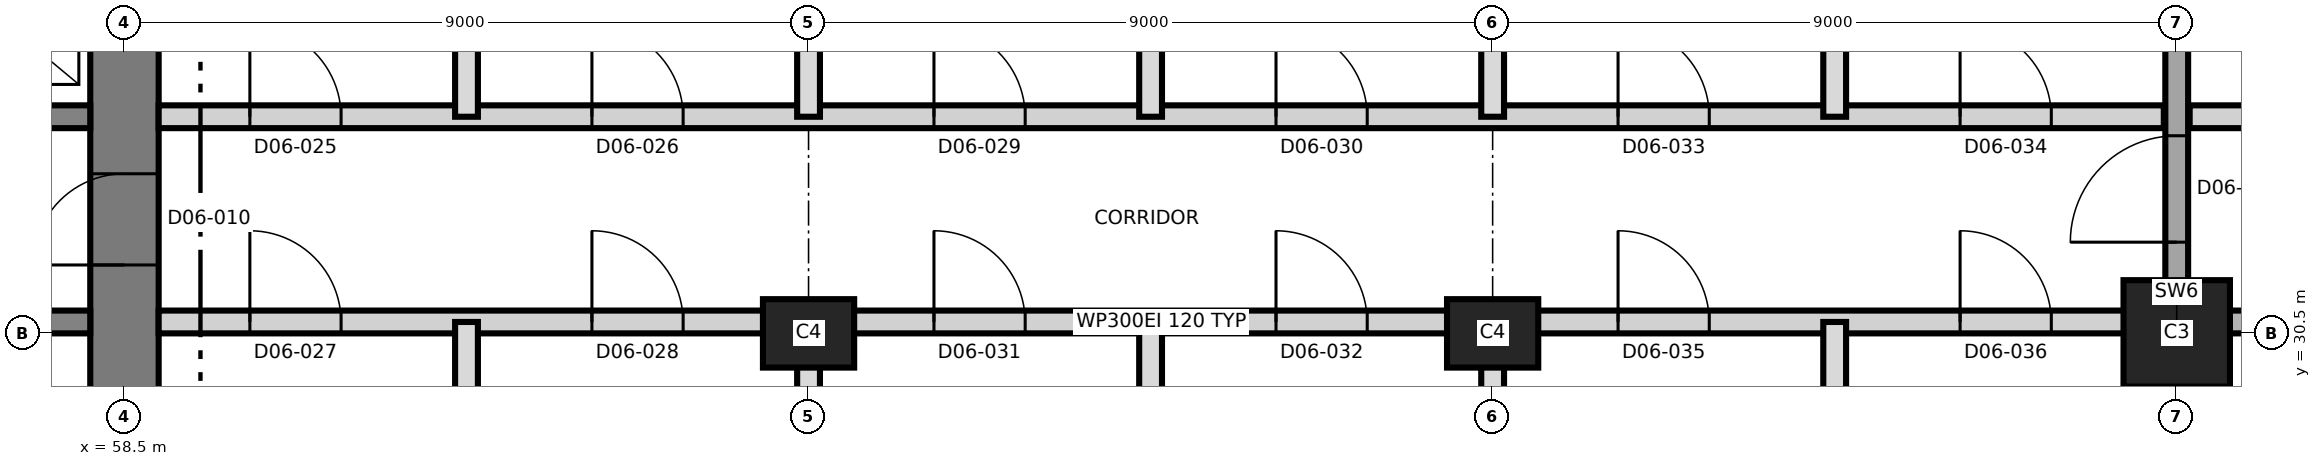
"""IFC4 building model, lengths in metres.
Left out: names, types, materials, properties, quantities, classifications, styles, units other than length and angle.
Written with IfcOpenShell. Run it as: python <this file> out.ifc"""

import sys

from ifc_helpers import new_model, si_unit, direction, frame, frame_2d, origin, origin_2d, place, context, subcontext, project, spatial, rectangle, extrude, element, fill, save


model = new_model("IFC4")
c1 = context("Model", 3, precision=1e-05, world=origin(), true_north=direction((0.0, 1.0)))
c2 = subcontext(c1, "Body", "Model", "MODEL_VIEW")
j1 = project(units=[si_unit("LENGTHUNIT", "METRE"), si_unit("PLANEANGLEUNIT", "RADIAN")], contexts=[c1])
p1 = place(None, origin())
s1 = spatial("IfcSite", under=j1, at=p1, CompositionType="ELEMENT")
p2 = place(p1, origin())
s2 = spatial("IfcBuilding", under=s1, at=p2, CompositionType="ELEMENT")
p3 = place(p2, frame((0.0, 0.0, 81.6)))
s3 = spatial("IfcBuildingStorey", under=s2, at=p3, CompositionType="ELEMENT", Elevation=81.6)
p4 = place(p3, frame((58.5, 21.05, 0.0), z_axis=(0.0, 0.0, 1.0), x_axis=(0.0, 1.0, 0.0)))
e1 = element("IfcWall", 1, at=p4, inside=s3, PredefinedType="SHEAR", context=c2, shape_type="SweptSolid", body=[
    extrude(rectangle(XDim=18.9, YDim=0.9, at=frame_2d((9.45, 0.0))), origin(), (0.0, 0.0, 1.0), 5.5),
])
p5 = place(p4, frame((10.35, 0.0, 0.0)))
e2 = element("IfcOpeningElement", 2, at=p5, cuts=e1, PredefinedType="OPENING", context=c2, shape_type="SweptSolid", body=[
    extrude(rectangle(XDim=1.2, YDim=2.1, at=frame_2d((0.6, 1.05))), frame((0.0, 0.46, 0.0), z_axis=(0.0, -1.0, 0.0), x_axis=(1.0, 0.0, 0.0)), (0.0, 0.0, 1.0), 0.92),
])
p6 = place(p3, frame((31.95, 30.65, 0.0), z_axis=(0.0, 0.0, 1.0), x_axis=(1.0, 0.0, 0.0)))
e3 = element("IfcWall", 3, at=p6, inside=s3, PredefinedType="SHEAR", context=c2, shape_type="SweptSolid", body=[
    extrude(rectangle(XDim=26.1, YDim=0.3, at=frame_2d((13.05, 0.0))), origin(), (0.0, 0.0, 1.0), 5.5),
])
p7 = place(p6, frame((24.55, 0.0, 0.0)))
e4 = element("IfcOpeningElement", 4, at=p7, cuts=e3, PredefinedType="OPENING", context=c2, shape_type="SweptSolid", body=[
    extrude(rectangle(XDim=1.0, YDim=2.1, at=frame_2d((0.5, 1.05))), frame((0.0, 0.16, 0.0), z_axis=(0.0, -1.0, 0.0), x_axis=(1.0, 0.0, 0.0)), (0.0, 0.0, 1.0), 0.32),
])
p8 = place(p6, frame((11.35, 0.0, 0.0)))
e5 = element("IfcOpeningElement", 5, at=p8, cuts=e3, PredefinedType="OPENING", context=c2, shape_type="SweptSolid", body=[
    extrude(rectangle(XDim=1.0, YDim=2.1, at=frame_2d((0.5, 1.05))), frame((0.0, 0.16, 0.0), z_axis=(0.0, -1.0, 0.0), x_axis=(1.0, 0.0, 0.0)), (0.0, 0.0, 1.0), 0.32),
])
p9 = place(p3, frame((31.95, 33.35, 0.0), z_axis=(0.0, 0.0, 1.0), x_axis=(1.0, 0.0, 0.0)))
e6 = element("IfcWall", 6, at=p9, inside=s3, PredefinedType="SHEAR", context=c2, shape_type="SweptSolid", body=[
    extrude(rectangle(XDim=26.1, YDim=0.3, at=frame_2d((13.05, 0.0))), origin(), (0.0, 0.0, 1.0), 5.5),
])
p10 = place(p9, frame((13.7, 0.0, 0.0)))
e7 = element("IfcOpeningElement", 7, at=p10, cuts=e6, PredefinedType="OPENING", context=c2, shape_type="SweptSolid", body=[
    extrude(rectangle(XDim=1.4, YDim=2.1, at=frame_2d((0.7, 1.05))), frame((0.0, 0.16, 0.0), z_axis=(0.0, -1.0, 0.0), x_axis=(1.0, 0.0, 0.0)), (0.0, 0.0, 1.0), 0.32),
])
p11 = place(p9, frame((5.175, 0.0, 0.0)))
e8 = element("IfcOpeningElement", 8, at=p11, cuts=e6, PredefinedType="OPENING", context=c2, shape_type="SweptSolid", body=[
    extrude(rectangle(XDim=1.2, YDim=2.1, at=frame_2d((0.6, 1.05))), frame((0.0, 0.16, 0.0), z_axis=(0.0, -1.0, 0.0), x_axis=(1.0, 0.0, 0.0)), (0.0, 0.0, 1.0), 0.32),
])
p12 = place(p9, frame((19.725, 0.0, 0.0)))
e9 = element("IfcOpeningElement", 9, at=p12, cuts=e6, PredefinedType="OPENING", context=c2, shape_type="SweptSolid", body=[
    extrude(rectangle(XDim=1.2, YDim=2.1, at=frame_2d((0.6, 1.05))), frame((0.0, 0.16, 0.0), z_axis=(0.0, -1.0, 0.0), x_axis=(1.0, 0.0, 0.0)), (0.0, 0.0, 1.0), 0.32),
])
for number, where, z_axis, x_axis in (
    (10, (67.5, 30.5, 0.0), (0.0, 0.0, 1.0), (1.0, 0.0, 0.0)),
    (11, (76.5, 30.5, 0.0), (0.0, 0.0, 1.0), (1.0, 0.0, 0.0)),
):
    element("IfcColumn", number, at=place(p3, frame(where, z_axis=z_axis, x_axis=x_axis)), inside=s3, PredefinedType="COLUMN", context=c2, shape_type="SweptSolid", body=[
        extrude(rectangle(XDim=1.2, YDim=0.9, at=origin_2d()), origin(), (0.0, 0.0, 1.0), 5.5),
    ])
p13 = place(p3, frame((85.5, 30.5, 0.0), z_axis=(0.0, 0.0, 1.0), x_axis=(1.0, 0.0, 0.0)))
e12 = element("IfcColumn", 12, at=p13, inside=s3, PredefinedType="COLUMN", context=c2, shape_type="SweptSolid", body=[
    extrude(rectangle(XDim=1.4, YDim=1.4, at=origin_2d()), origin(), (0.0, 0.0, 1.0), 5.5),
])
p14 = place(p3, frame((85.5, 20.35, 0.0), z_axis=(0.0, 0.0, 1.0), x_axis=(0.0, 1.0, 0.0)))
e13 = element("IfcWall", 13, at=p14, inside=s3, PredefinedType="SHEAR", context=c2, shape_type="SweptSolid", body=[
    extrude(rectangle(XDim=20.3, YDim=0.3, at=frame_2d((10.15, 0.0))), origin(), (0.0, 0.0, 1.0), 5.5),
])
p15 = place(p14, frame((11.35, 0.0, 0.0)))
e14 = element("IfcOpeningElement", 14, at=p15, cuts=e13, PredefinedType="OPENING", context=c2, shape_type="SweptSolid", body=[
    extrude(rectangle(XDim=1.4, YDim=2.1, at=frame_2d((0.7, 1.05))), frame((0.0, 0.16, 0.0), z_axis=(0.0, -1.0, 0.0), x_axis=(1.0, 0.0, 0.0)), (0.0, 0.0, 1.0), 0.32),
])
p16 = place(p3, frame((58.95, 30.65, 0.0), z_axis=(0.0, 0.0, 1.0), x_axis=(1.0, 0.0, 0.0)))
e15 = element("IfcWall", 15, at=p16, inside=s3, PredefinedType="PARTITIONING", context=c2, shape_type="SweptSolid", body=[
    extrude(rectangle(XDim=26.38, YDim=0.3, at=frame_2d((13.19, 0.0))), origin(), (0.0, 0.0, 1.0), 5.2),
])
p17 = place(p16, frame((1.2, 0.0, 0.0)))
e16 = element("IfcOpeningElement", 16, at=p17, cuts=e15, PredefinedType="OPENING", context=c2, shape_type="SweptSolid", body=[
    extrude(rectangle(XDim=1.2, YDim=2.1, at=frame_2d((0.6, 1.05))), frame((0.0, 0.16, 0.0), z_axis=(0.0, -1.0, 0.0), x_axis=(1.0, 0.0, 0.0)), (0.0, 0.0, 1.0), 0.32),
])
p18 = place(p16, frame((5.7, 0.0, 0.0)))
e17 = element("IfcOpeningElement", 17, at=p18, cuts=e15, PredefinedType="OPENING", context=c2, shape_type="SweptSolid", body=[
    extrude(rectangle(XDim=1.2, YDim=2.1, at=frame_2d((0.6, 1.05))), frame((0.0, 0.16, 0.0), z_axis=(0.0, -1.0, 0.0), x_axis=(1.0, 0.0, 0.0)), (0.0, 0.0, 1.0), 0.32),
])
p19 = place(p16, frame((10.2, 0.0, 0.0)))
e18 = element("IfcOpeningElement", 18, at=p19, cuts=e15, PredefinedType="OPENING", context=c2, shape_type="SweptSolid", body=[
    extrude(rectangle(XDim=1.2, YDim=2.1, at=frame_2d((0.6, 1.05))), frame((0.0, 0.16, 0.0), z_axis=(0.0, -1.0, 0.0), x_axis=(1.0, 0.0, 0.0)), (0.0, 0.0, 1.0), 0.32),
])
p20 = place(p16, frame((14.7, 0.0, 0.0)))
e19 = element("IfcOpeningElement", 19, at=p20, cuts=e15, PredefinedType="OPENING", context=c2, shape_type="SweptSolid", body=[
    extrude(rectangle(XDim=1.2, YDim=2.1, at=frame_2d((0.6, 1.05))), frame((0.0, 0.16, 0.0), z_axis=(0.0, -1.0, 0.0), x_axis=(1.0, 0.0, 0.0)), (0.0, 0.0, 1.0), 0.32),
])
p21 = place(p16, frame((19.2, 0.0, 0.0)))
e20 = element("IfcOpeningElement", 20, at=p21, cuts=e15, PredefinedType="OPENING", context=c2, shape_type="SweptSolid", body=[
    extrude(rectangle(XDim=1.2, YDim=2.1, at=frame_2d((0.6, 1.05))), frame((0.0, 0.16, 0.0), z_axis=(0.0, -1.0, 0.0), x_axis=(1.0, 0.0, 0.0)), (0.0, 0.0, 1.0), 0.32),
])
p22 = place(p16, frame((23.7, 0.0, 0.0)))
e21 = element("IfcOpeningElement", 21, at=p22, cuts=e15, PredefinedType="OPENING", context=c2, shape_type="SweptSolid", body=[
    extrude(rectangle(XDim=1.2, YDim=2.1, at=frame_2d((0.6, 1.05))), frame((0.0, 0.16, 0.0), z_axis=(0.0, -1.0, 0.0), x_axis=(1.0, 0.0, 0.0)), (0.0, 0.0, 1.0), 0.32),
])
p23 = place(p3, frame((85.67, 30.65, 0.0), z_axis=(0.0, 0.0, 1.0), x_axis=(1.0, 0.0, 0.0)))
e22 = element("IfcWall", 22, at=p23, inside=s3, PredefinedType="SHEAR", context=c2, shape_type="SweptSolid", body=[
    extrude(rectangle(XDim=9.58, YDim=0.3, at=frame_2d((4.79, 0.0))), origin(), (0.0, 0.0, 1.0), 5.2),
])
p24 = place(p23, frame((2.08, 0.0, 0.0)))
e23 = element("IfcOpeningElement", 23, at=p24, cuts=e22, PredefinedType="OPENING", context=c2, shape_type="SweptSolid", body=[
    extrude(rectangle(XDim=1.2, YDim=2.1, at=frame_2d((0.6, 1.05))), frame((0.0, 0.16, 0.0), z_axis=(0.0, -1.0, 0.0), x_axis=(1.0, 0.0, 0.0)), (0.0, 0.0, 1.0), 0.32),
])
p25 = place(p23, frame((5.63, 0.0, 0.0)))
e24 = element("IfcOpeningElement", 24, at=p25, cuts=e22, PredefinedType="OPENING", context=c2, shape_type="SweptSolid", body=[
    extrude(rectangle(XDim=1.0, YDim=2.1, at=frame_2d((0.5, 1.05))), frame((0.0, 0.16, 0.0), z_axis=(0.0, -1.0, 0.0), x_axis=(1.0, 0.0, 0.0)), (0.0, 0.0, 1.0), 0.32),
])
p26 = place(p3, frame((58.95, 33.35, 0.0), z_axis=(0.0, 0.0, 1.0), x_axis=(1.0, 0.0, 0.0)))
e25 = element("IfcWall", 25, at=p26, inside=s3, PredefinedType="PARTITIONING", context=c2, shape_type="SweptSolid", body=[
    extrude(rectangle(XDim=26.38, YDim=0.3, at=frame_2d((13.19, 0.0))), origin(), (0.0, 0.0, 1.0), 5.2),
])
p27 = place(p26, frame((1.2, 0.0, 0.0)))
e26 = element("IfcOpeningElement", 26, at=p27, cuts=e25, PredefinedType="OPENING", context=c2, shape_type="SweptSolid", body=[
    extrude(rectangle(XDim=1.2, YDim=2.1, at=frame_2d((0.6, 1.05))), frame((0.0, 0.16, 0.0), z_axis=(0.0, -1.0, 0.0), x_axis=(1.0, 0.0, 0.0)), (0.0, 0.0, 1.0), 0.32),
])
p28 = place(p26, frame((5.7, 0.0, 0.0)))
e27 = element("IfcOpeningElement", 27, at=p28, cuts=e25, PredefinedType="OPENING", context=c2, shape_type="SweptSolid", body=[
    extrude(rectangle(XDim=1.2, YDim=2.1, at=frame_2d((0.6, 1.05))), frame((0.0, 0.16, 0.0), z_axis=(0.0, -1.0, 0.0), x_axis=(1.0, 0.0, 0.0)), (0.0, 0.0, 1.0), 0.32),
])
p29 = place(p26, frame((10.2, 0.0, 0.0)))
e28 = element("IfcOpeningElement", 28, at=p29, cuts=e25, PredefinedType="OPENING", context=c2, shape_type="SweptSolid", body=[
    extrude(rectangle(XDim=1.2, YDim=2.1, at=frame_2d((0.6, 1.05))), frame((0.0, 0.16, 0.0), z_axis=(0.0, -1.0, 0.0), x_axis=(1.0, 0.0, 0.0)), (0.0, 0.0, 1.0), 0.32),
])
p30 = place(p26, frame((14.7, 0.0, 0.0)))
e29 = element("IfcOpeningElement", 29, at=p30, cuts=e25, PredefinedType="OPENING", context=c2, shape_type="SweptSolid", body=[
    extrude(rectangle(XDim=1.2, YDim=2.1, at=frame_2d((0.6, 1.05))), frame((0.0, 0.16, 0.0), z_axis=(0.0, -1.0, 0.0), x_axis=(1.0, 0.0, 0.0)), (0.0, 0.0, 1.0), 0.32),
])
p31 = place(p26, frame((19.2, 0.0, 0.0)))
e30 = element("IfcOpeningElement", 30, at=p31, cuts=e25, PredefinedType="OPENING", context=c2, shape_type="SweptSolid", body=[
    extrude(rectangle(XDim=1.2, YDim=2.1, at=frame_2d((0.6, 1.05))), frame((0.0, 0.16, 0.0), z_axis=(0.0, -1.0, 0.0), x_axis=(1.0, 0.0, 0.0)), (0.0, 0.0, 1.0), 0.32),
])
p32 = place(p26, frame((23.7, 0.0, 0.0)))
e31 = element("IfcOpeningElement", 31, at=p32, cuts=e25, PredefinedType="OPENING", context=c2, shape_type="SweptSolid", body=[
    extrude(rectangle(XDim=1.2, YDim=2.1, at=frame_2d((0.6, 1.05))), frame((0.0, 0.16, 0.0), z_axis=(0.0, -1.0, 0.0), x_axis=(1.0, 0.0, 0.0)), (0.0, 0.0, 1.0), 0.32),
])
p33 = place(p3, frame((85.67, 33.35, 0.0), z_axis=(0.0, 0.0, 1.0), x_axis=(1.0, 0.0, 0.0)))
e32 = element("IfcWall", 32, at=p33, inside=s3, PredefinedType="PARTITIONING", context=c2, shape_type="SweptSolid", body=[
    extrude(rectangle(XDim=9.705, YDim=0.3, at=frame_2d((4.853, 0.0))), origin(), (0.0, 0.0, 1.0), 5.15),
])
p34 = place(p33, frame((2.73, 0.0, 0.0)))
e33 = element("IfcOpeningElement", 33, at=p34, cuts=e32, PredefinedType="OPENING", context=c2, shape_type="SweptSolid", body=[
    extrude(rectangle(XDim=1.2, YDim=2.1, at=frame_2d((0.6, 1.05))), frame((0.0, 0.16, 0.0), z_axis=(0.0, -1.0, 0.0), x_axis=(1.0, 0.0, 0.0)), (0.0, 0.0, 1.0), 0.32),
])
p35 = place(p3, frame((63.0, 21.9, 0.0), z_axis=(0.0, 0.0, 1.0), x_axis=(0.0, 1.0, 0.0)))
e34 = element("IfcWall", 34, at=p35, inside=s3, PredefinedType="PARTITIONING", context=c2, shape_type="SweptSolid", body=[
    extrude(rectangle(XDim=8.75, YDim=0.3, at=frame_2d((4.375, 0.0))), origin(), (0.0, 0.0, 1.0), 5.2),
])
p36 = place(p3, frame((63.0, 33.35, 0.0), z_axis=(0.0, 0.0, 1.0), x_axis=(0.0, 1.0, 0.0)))
e35 = element("IfcWall", 35, at=p36, inside=s3, PredefinedType="PARTITIONING", context=c2, shape_type="SweptSolid", body=[
    extrude(rectangle(XDim=5.75, YDim=0.3, at=frame_2d((2.875, 0.0))), origin(), (0.0, 0.0, 1.0), 5.2),
])
p37 = place(p3, frame((67.5, 21.9, 0.0), z_axis=(0.0, 0.0, 1.0), x_axis=(0.0, 1.0, 0.0)))
e36 = element("IfcWall", 36, at=p37, inside=s3, PredefinedType="PARTITIONING", context=c2, shape_type="SweptSolid", body=[
    extrude(rectangle(XDim=8.75, YDim=0.3, at=frame_2d((4.375, 0.0))), origin(), (0.0, 0.0, 1.0), 5.2),
])
p38 = place(p3, frame((67.5, 33.35, 0.0), z_axis=(0.0, 0.0, 1.0), x_axis=(0.0, 1.0, 0.0)))
e37 = element("IfcWall", 37, at=p38, inside=s3, PredefinedType="PARTITIONING", context=c2, shape_type="SweptSolid", body=[
    extrude(rectangle(XDim=5.75, YDim=0.3, at=frame_2d((2.875, 0.0))), origin(), (0.0, 0.0, 1.0), 5.2),
])
p39 = place(p3, frame((72.0, 21.9, 0.0), z_axis=(0.0, 0.0, 1.0), x_axis=(0.0, 1.0, 0.0)))
e38 = element("IfcWall", 38, at=p39, inside=s3, PredefinedType="PARTITIONING", context=c2, shape_type="SweptSolid", body=[
    extrude(rectangle(XDim=8.75, YDim=0.3, at=frame_2d((4.375, 0.0))), origin(), (0.0, 0.0, 1.0), 5.2),
])
p40 = place(p3, frame((72.0, 33.35, 0.0), z_axis=(0.0, 0.0, 1.0), x_axis=(0.0, 1.0, 0.0)))
e39 = element("IfcWall", 39, at=p40, inside=s3, PredefinedType="PARTITIONING", context=c2, shape_type="SweptSolid", body=[
    extrude(rectangle(XDim=5.75, YDim=0.3, at=frame_2d((2.875, 0.0))), origin(), (0.0, 0.0, 1.0), 5.2),
])
p41 = place(p3, frame((76.5, 21.9, 0.0), z_axis=(0.0, 0.0, 1.0), x_axis=(0.0, 1.0, 0.0)))
e40 = element("IfcWall", 40, at=p41, inside=s3, PredefinedType="PARTITIONING", context=c2, shape_type="SweptSolid", body=[
    extrude(rectangle(XDim=8.75, YDim=0.3, at=frame_2d((4.375, 0.0))), origin(), (0.0, 0.0, 1.0), 5.2),
])
p42 = place(p3, frame((76.5, 33.35, 0.0), z_axis=(0.0, 0.0, 1.0), x_axis=(0.0, 1.0, 0.0)))
e41 = element("IfcWall", 41, at=p42, inside=s3, PredefinedType="PARTITIONING", context=c2, shape_type="SweptSolid", body=[
    extrude(rectangle(XDim=5.75, YDim=0.3, at=frame_2d((2.875, 0.0))), origin(), (0.0, 0.0, 1.0), 5.2),
])
p43 = place(p3, frame((81.0, 21.9, 0.0), z_axis=(0.0, 0.0, 1.0), x_axis=(0.0, 1.0, 0.0)))
e42 = element("IfcWall", 42, at=p43, inside=s3, PredefinedType="PARTITIONING", context=c2, shape_type="SweptSolid", body=[
    extrude(rectangle(XDim=8.75, YDim=0.3, at=frame_2d((4.375, 0.0))), origin(), (0.0, 0.0, 1.0), 5.2),
])
p44 = place(p3, frame((81.0, 33.35, 0.0), z_axis=(0.0, 0.0, 1.0), x_axis=(0.0, 1.0, 0.0)))
e43 = element("IfcWall", 43, at=p44, inside=s3, PredefinedType="PARTITIONING", context=c2, shape_type="SweptSolid", body=[
    extrude(rectangle(XDim=5.75, YDim=0.3, at=frame_2d((2.875, 0.0))), origin(), (0.0, 0.0, 1.0), 5.2),
])
p45 = place(p5, origin())
e44 = element("IfcDoor", 44, at=p45, inside=s3, OperationType="SINGLE_SWING_LEFT", PredefinedType="DOOR", context=c2, shape_type="SweptSolid", body=[
    extrude(rectangle(XDim=1.2, YDim=2.1, at=frame_2d((0.6, 1.05))), frame((0.0, 0.025, 0.0), z_axis=(0.0, -1.0, 0.0), x_axis=(1.0, 0.0, 0.0)), (0.0, 0.0, 1.0), 0.05),
])
fill(e2, e44)
p46 = place(p27, origin())
e45 = element("IfcDoor", 45, at=p46, inside=s3, OperationType="SINGLE_SWING_LEFT", PredefinedType="DOOR", context=c2, shape_type="SweptSolid", body=[
    extrude(rectangle(XDim=1.2, YDim=2.1, at=frame_2d((0.6, 1.05))), frame((0.0, 0.025, 0.0), z_axis=(0.0, -1.0, 0.0), x_axis=(1.0, 0.0, 0.0)), (0.0, 0.0, 1.0), 0.05),
])
fill(e26, e45)
p47 = place(p28, origin())
e46 = element("IfcDoor", 46, at=p47, inside=s3, OperationType="SINGLE_SWING_LEFT", PredefinedType="DOOR", context=c2, shape_type="SweptSolid", body=[
    extrude(rectangle(XDim=1.2, YDim=2.1, at=frame_2d((0.6, 1.05))), frame((0.0, 0.025, 0.0), z_axis=(0.0, -1.0, 0.0), x_axis=(1.0, 0.0, 0.0)), (0.0, 0.0, 1.0), 0.05),
])
fill(e27, e46)
p48 = place(p17, origin())
e47 = element("IfcDoor", 47, at=p48, inside=s3, OperationType="SINGLE_SWING_RIGHT", PredefinedType="DOOR", context=c2, shape_type="SweptSolid", body=[
    extrude(rectangle(XDim=1.2, YDim=2.1, at=frame_2d((0.6, 1.05))), frame((0.0, 0.025, 0.0), z_axis=(0.0, -1.0, 0.0), x_axis=(1.0, 0.0, 0.0)), (0.0, 0.0, 1.0), 0.05),
])
fill(e16, e47)
p49 = place(p18, origin())
e48 = element("IfcDoor", 48, at=p49, inside=s3, OperationType="SINGLE_SWING_LEFT", PredefinedType="DOOR", context=c2, shape_type="SweptSolid", body=[
    extrude(rectangle(XDim=1.2, YDim=2.1, at=frame_2d((0.6, 1.05))), frame((0.0, 0.025, 0.0), z_axis=(0.0, -1.0, 0.0), x_axis=(1.0, 0.0, 0.0)), (0.0, 0.0, 1.0), 0.05),
])
fill(e17, e48)
p50 = place(p29, origin())
e49 = element("IfcDoor", 49, at=p50, inside=s3, OperationType="SINGLE_SWING_LEFT", PredefinedType="DOOR", context=c2, shape_type="SweptSolid", body=[
    extrude(rectangle(XDim=1.2, YDim=2.1, at=frame_2d((0.6, 1.05))), frame((0.0, 0.025, 0.0), z_axis=(0.0, -1.0, 0.0), x_axis=(1.0, 0.0, 0.0)), (0.0, 0.0, 1.0), 0.05),
])
fill(e28, e49)
p51 = place(p30, origin())
e50 = element("IfcDoor", 50, at=p51, inside=s3, OperationType="SINGLE_SWING_RIGHT", PredefinedType="DOOR", context=c2, shape_type="SweptSolid", body=[
    extrude(rectangle(XDim=1.2, YDim=2.1, at=frame_2d((0.6, 1.05))), frame((0.0, 0.025, 0.0), z_axis=(0.0, -1.0, 0.0), x_axis=(1.0, 0.0, 0.0)), (0.0, 0.0, 1.0), 0.05),
])
fill(e29, e50)
p52 = place(p19, origin())
e51 = element("IfcDoor", 51, at=p52, inside=s3, OperationType="SINGLE_SWING_LEFT", PredefinedType="DOOR", context=c2, shape_type="SweptSolid", body=[
    extrude(rectangle(XDim=1.2, YDim=2.1, at=frame_2d((0.6, 1.05))), frame((0.0, 0.025, 0.0), z_axis=(0.0, -1.0, 0.0), x_axis=(1.0, 0.0, 0.0)), (0.0, 0.0, 1.0), 0.05),
])
fill(e18, e51)
p53 = place(p20, origin())
e52 = element("IfcDoor", 52, at=p53, inside=s3, OperationType="SINGLE_SWING_LEFT", PredefinedType="DOOR", context=c2, shape_type="SweptSolid", body=[
    extrude(rectangle(XDim=1.2, YDim=2.1, at=frame_2d((0.6, 1.05))), frame((0.0, 0.025, 0.0), z_axis=(0.0, -1.0, 0.0), x_axis=(1.0, 0.0, 0.0)), (0.0, 0.0, 1.0), 0.05),
])
fill(e19, e52)
p54 = place(p31, origin())
e53 = element("IfcDoor", 53, at=p54, inside=s3, OperationType="SINGLE_SWING_RIGHT", PredefinedType="DOOR", context=c2, shape_type="SweptSolid", body=[
    extrude(rectangle(XDim=1.2, YDim=2.1, at=frame_2d((0.6, 1.05))), frame((0.0, 0.025, 0.0), z_axis=(0.0, -1.0, 0.0), x_axis=(1.0, 0.0, 0.0)), (0.0, 0.0, 1.0), 0.05),
])
fill(e30, e53)
p55 = place(p32, origin())
e54 = element("IfcDoor", 54, at=p55, inside=s3, OperationType="SINGLE_SWING_LEFT", PredefinedType="DOOR", context=c2, shape_type="SweptSolid", body=[
    extrude(rectangle(XDim=1.2, YDim=2.1, at=frame_2d((0.6, 1.05))), frame((0.0, 0.025, 0.0), z_axis=(0.0, -1.0, 0.0), x_axis=(1.0, 0.0, 0.0)), (0.0, 0.0, 1.0), 0.05),
])
fill(e31, e54)
p56 = place(p21, origin())
e55 = element("IfcDoor", 55, at=p56, inside=s3, OperationType="SINGLE_SWING_LEFT", PredefinedType="DOOR", context=c2, shape_type="SweptSolid", body=[
    extrude(rectangle(XDim=1.2, YDim=2.1, at=frame_2d((0.6, 1.05))), frame((0.0, 0.025, 0.0), z_axis=(0.0, -1.0, 0.0), x_axis=(1.0, 0.0, 0.0)), (0.0, 0.0, 1.0), 0.05),
])
fill(e20, e55)
p57 = place(p22, origin())
e56 = element("IfcDoor", 56, at=p57, inside=s3, OperationType="SINGLE_SWING_RIGHT", PredefinedType="DOOR", context=c2, shape_type="SweptSolid", body=[
    extrude(rectangle(XDim=1.2, YDim=2.1, at=frame_2d((0.6, 1.05))), frame((0.0, 0.025, 0.0), z_axis=(0.0, -1.0, 0.0), x_axis=(1.0, 0.0, 0.0)), (0.0, 0.0, 1.0), 0.05),
])
fill(e21, e56)
p58 = place(p15, origin())
e57 = element("IfcDoor", 57, at=p58, inside=s3, OperationType="SINGLE_SWING_RIGHT", PredefinedType="DOOR", context=c2, shape_type="SweptSolid", body=[
    extrude(rectangle(XDim=1.4, YDim=2.1, at=frame_2d((0.7, 1.05))), frame((0.0, 0.025, 0.0), z_axis=(0.0, -1.0, 0.0), x_axis=(1.0, 0.0, 0.0)), (0.0, 0.0, 1.0), 0.05),
])
fill(e14, e57)
save(model, sys.argv[1])
